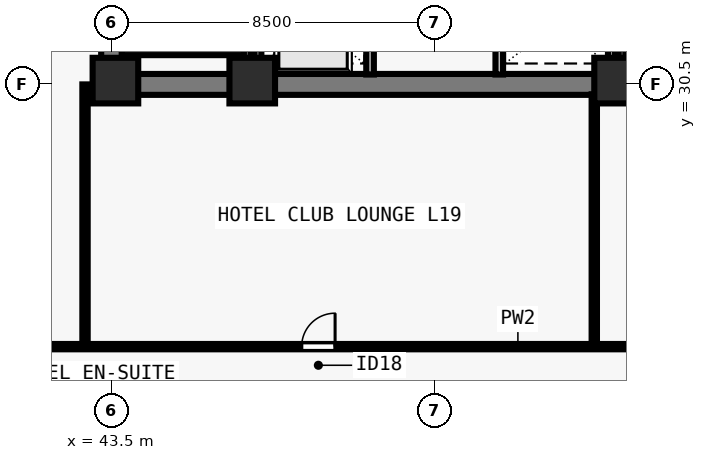
"""IFC4 building model, lengths in metres.
Left out: names, types, materials, properties, quantities, classifications, styles, units other than length and angle.
Written with IfcOpenShell. Run it as: python <this file> out.ifc"""

import sys

from ifc_helpers import new_model, si_unit, direction, frame, frame_2d, origin, origin_2d, place, context, subcontext, project, spatial, rectangle, extrude, element, fill, save


model = new_model("IFC4")
c1 = context("Model", 3, precision=1e-05, world=origin(), true_north=direction((0.0, 1.0)))
c2 = subcontext(c1, "Body", "Model", "MODEL_VIEW")
j1 = project(units=[si_unit("LENGTHUNIT", "METRE"), si_unit("PLANEANGLEUNIT", "RADIAN")], contexts=[c1])
p1 = place(None, origin())
s1 = spatial("IfcSite", under=j1, at=p1, CompositionType="ELEMENT")
p2 = place(p1, origin())
s2 = spatial("IfcBuilding", under=s1, at=p2, CompositionType="ELEMENT")
p3 = place(p2, frame((0.0, 0.0, 72.5)))
s3 = spatial("IfcBuildingStorey", under=s2, at=p3, CompositionType="ELEMENT", Elevation=72.5)
for number, where, z_axis, x_axis in (
    (1, (43.6, 30.6, 0.0), (0.0, 0.0, 1.0), (1.0, 0.0, 0.0)),
    (2, (47.2, 30.6, 0.0), (0.0, 0.0, 1.0), (1.0, 0.0, 0.0)),
    (3, (56.8, 30.6, 0.0), (0.0, 0.0, 1.0), (1.0, 0.0, 0.0)),
):
    element("IfcColumn", number, at=place(p3, frame(where, z_axis=z_axis, x_axis=x_axis)), inside=s3, PredefinedType="COLUMN", context=c2, shape_type="SweptSolid", body=[
        extrude(rectangle(XDim=1.2, YDim=1.2, at=origin_2d()), origin(), (0.0, 0.0, 1.0), 3.5),
    ])
p4 = place(p3, frame((43.225, 30.5, 0.0), z_axis=(0.0, 0.0, 1.0), x_axis=(1.0, 0.0, 0.0)))
e4 = element("IfcWall", 4, at=p4, inside=s3, PredefinedType="SHEAR", context=c2, shape_type="SweptSolid", body=[
    extrude(rectangle(XDim=17.55, YDim=0.55, at=frame_2d((8.775, 0.0))), origin(), (0.0, 0.0, 1.0), 3.28),
])
p5 = place(p3, frame((43.5, 30.765, 0.0), z_axis=(0.0, 0.0, 1.0), x_axis=(0.0, 1.0, 0.0)))
e5 = element("IfcWall", 5, at=p5, inside=s3, PredefinedType="SHEAR", context=c2, shape_type="SweptSolid", body=[
    extrude(rectangle(XDim=7.985, YDim=0.55, at=frame_2d((3.993, 0.0))), origin(), (0.0, 0.0, 1.0), 3.28),
])
p6 = place(p3, frame((50.3, 30.76, 0.0), z_axis=(0.0, 0.0, 1.0), x_axis=(0.0, 1.0, 0.0)))
e6 = element("IfcWall", 6, at=p6, inside=s3, PredefinedType="SOLIDWALL", context=c2, shape_type="SweptSolid", body=[
    extrude(rectangle(XDim=7.855, YDim=0.2, at=frame_2d((3.927, 0.0))), origin(), (0.0, 0.0, 1.0), 3.28),
])
p7 = place(p6, frame((0.79, 0.0, 0.0)))
e7 = element("IfcOpeningElement", 7, at=p7, cuts=e6, PredefinedType="OPENING", context=c2, shape_type="SweptSolid", body=[
    extrude(rectangle(XDim=1.1, YDim=2.2, at=frame_2d((0.55, 1.1))), frame((0.0, 0.11, 0.0), z_axis=(0.0, -1.0, 0.0), x_axis=(1.0, 0.0, 0.0)), (0.0, 0.0, 1.0), 0.22),
])
p8 = place(p6, frame((3.49, 0.0, 0.0)))
e8 = element("IfcOpeningElement", 8, at=p8, cuts=e6, PredefinedType="OPENING", context=c2, shape_type="SweptSolid", body=[
    extrude(rectangle(XDim=1.1, YDim=2.2, at=frame_2d((0.55, 1.1))), frame((0.0, 0.11, 0.0), z_axis=(0.0, -1.0, 0.0), x_axis=(1.0, 0.0, 0.0)), (0.0, 0.0, 1.0), 0.22),
])
p9 = place(p6, frame((6.19, 0.0, 0.0)))
e9 = element("IfcOpeningElement", 9, at=p9, cuts=e6, PredefinedType="OPENING", context=c2, shape_type="SweptSolid", body=[
    extrude(rectangle(XDim=1.1, YDim=2.2, at=frame_2d((0.55, 1.1))), frame((0.0, 0.11, 0.0), z_axis=(0.0, -1.0, 0.0), x_axis=(1.0, 0.0, 0.0)), (0.0, 0.0, 1.0), 0.22),
])
p10 = place(p3, frame((53.7, 30.76, 0.0), z_axis=(0.0, 0.0, 1.0), x_axis=(0.0, 1.0, 0.0)))
e10 = element("IfcWall", 10, at=p10, inside=s3, PredefinedType="SOLIDWALL", context=c2, shape_type="SweptSolid", body=[
    extrude(rectangle(XDim=7.855, YDim=0.2, at=frame_2d((3.927, 0.0))), origin(), (0.0, 0.0, 1.0), 3.28),
])
for number, where, z_axis, x_axis in (
    (11, (47.35, 30.76, 0.0), (0.0, 0.0, 1.0), (0.0, 1.0, 0.0)),
    (12, (56.65, 30.76, 0.0), (0.0, 0.0, 1.0), (0.0, 1.0, 0.0)),
):
    element("IfcWall", number, at=place(p3, frame(where, z_axis=z_axis, x_axis=x_axis)), inside=s3, PredefinedType="SOLIDWALL", context=c2, shape_type="SweptSolid", body=[
        extrude(rectangle(XDim=7.855, YDim=0.18, at=frame_2d((3.927, 0.0))), origin(), (0.0, 0.0, 1.0), 3.28),
    ])
p11 = place(p3, frame((37.2, 23.6, 0.0), z_axis=(0.0, 0.0, 1.0), x_axis=(1.0, 0.0, 0.0)))
e13 = element("IfcWall", 13, at=p11, inside=s3, PredefinedType="PARTITIONING", context=c2, shape_type="SweptSolid", body=[
    extrude(rectangle(XDim=29.6, YDim=0.14, at=frame_2d((14.8, 0.0))), origin(), (0.0, 0.0, 1.0), 3.28),
])
p12 = place(p11, frame((1.2, 0.0, 0.0)))
e14 = element("IfcOpeningElement", 14, at=p12, cuts=e13, PredefinedType="OPENING", context=c2, shape_type="SweptSolid", body=[
    extrude(rectangle(XDim=0.88, YDim=2.1, at=frame_2d((0.44, 1.05))), frame((0.0, 0.08, 0.0), z_axis=(0.0, -1.0, 0.0), x_axis=(1.0, 0.0, 0.0)), (0.0, 0.0, 1.0), 0.16),
])
p13 = place(p11, frame((11.3, 0.0, 0.0)))
e15 = element("IfcOpeningElement", 15, at=p13, cuts=e13, PredefinedType="OPENING", context=c2, shape_type="SweptSolid", body=[
    extrude(rectangle(XDim=0.88, YDim=2.1, at=frame_2d((0.44, 1.05))), frame((0.0, 0.08, 0.0), z_axis=(0.0, -1.0, 0.0), x_axis=(1.0, 0.0, 0.0)), (0.0, 0.0, 1.0), 0.16),
])
p14 = place(p11, frame((21.8, 0.0, 0.0)))
e16 = element("IfcOpeningElement", 16, at=p14, cuts=e13, PredefinedType="OPENING", context=c2, shape_type="SweptSolid", body=[
    extrude(rectangle(XDim=0.88, YDim=2.1, at=frame_2d((0.44, 1.05))), frame((0.0, 0.08, 0.0), z_axis=(0.0, -1.0, 0.0), x_axis=(1.0, 0.0, 0.0)), (0.0, 0.0, 1.0), 0.16),
])
p15 = place(p3, frame((42.8, 23.655, 0.0), z_axis=(0.0, 0.0, 1.0), x_axis=(0.0, 1.0, 0.0)))
e17 = element("IfcWall", 17, at=p15, inside=s3, PredefinedType="PARTITIONING", context=c2, shape_type="SweptSolid", body=[
    extrude(rectangle(XDim=6.845, YDim=0.14, at=frame_2d((3.422, 0.0))), origin(), (0.0, 0.0, 1.0), 2.439),
])
p16 = place(p3, frame((56.2, 23.655, 0.0), z_axis=(0.0, 0.0, 1.0), x_axis=(0.0, 1.0, 0.0)))
e18 = element("IfcWall", 18, at=p16, inside=s3, PredefinedType="PARTITIONING", context=c2, shape_type="SweptSolid", body=[
    extrude(rectangle(XDim=6.585, YDim=0.14, at=frame_2d((3.292, 0.0))), origin(), (0.0, 0.0, 1.0), 2.849),
])
p17 = place(p3, frame((43.765, 31.36, 0.0), z_axis=(0.0, 0.0, 1.0), x_axis=(1.0, 0.0, 0.0)))
e19 = element("IfcWall", 19, at=p17, inside=s3, PredefinedType="SOLIDWALL", context=c2, shape_type="SweptSolid", body=[
    extrude(rectangle(XDim=3.23, YDim=0.18, at=frame_2d((1.615, 0.0))), origin(), (0.0, 0.0, 1.0), 3.28),
])
p18 = place(p3, frame((47.07, 38.78, 0.0), z_axis=(0.0, 0.0, 1.0), x_axis=(0.0, -1.0, 0.0)))
e20 = element("IfcWall", 20, at=p18, inside=s3, PredefinedType="SOLIDWALL", context=c2, shape_type="SweptSolid", body=[
    extrude(rectangle(XDim=8.017, YDim=0.18, at=frame_2d((4.009, 0.0))), origin(), (0.0, 0.0, 1.0), 3.28),
])
p19 = place(p3, frame((57.005, 31.36, 0.0), z_axis=(0.0, 0.0, 1.0), x_axis=(1.0, 0.0, 0.0)))
e21 = element("IfcWall", 21, at=p19, inside=s3, PredefinedType="SOLIDWALL", context=c2, shape_type="SweptSolid", body=[
    extrude(rectangle(XDim=3.23, YDim=0.18, at=frame_2d((1.615, 0.0))), origin(), (0.0, 0.0, 1.0), 3.28),
])
p20 = place(p3, frame((56.93, 38.78, 0.0), z_axis=(0.0, 0.0, 1.0), x_axis=(0.0, -1.0, 0.0)))
e22 = element("IfcWall", 22, at=p20, inside=s3, PredefinedType="SOLIDWALL", context=c2, shape_type="SweptSolid", body=[
    extrude(rectangle(XDim=8.017, YDim=0.18, at=frame_2d((4.009, 0.0))), origin(), (0.0, 0.0, 1.0), 3.28),
])
p21 = place(p13, origin())
e23 = element("IfcDoor", 23, at=p21, inside=s3, OperationType="SINGLE_SWING_RIGHT", PredefinedType="DOOR", context=c2, shape_type="SweptSolid", body=[
    extrude(rectangle(XDim=0.88, YDim=2.1, at=frame_2d((0.44, 1.05))), frame((0.0, 0.025, 0.0), z_axis=(0.0, -1.0, 0.0), x_axis=(1.0, 0.0, 0.0)), (0.0, 0.0, 1.0), 0.05),
])
fill(e15, e23)
save(model, sys.argv[1])
